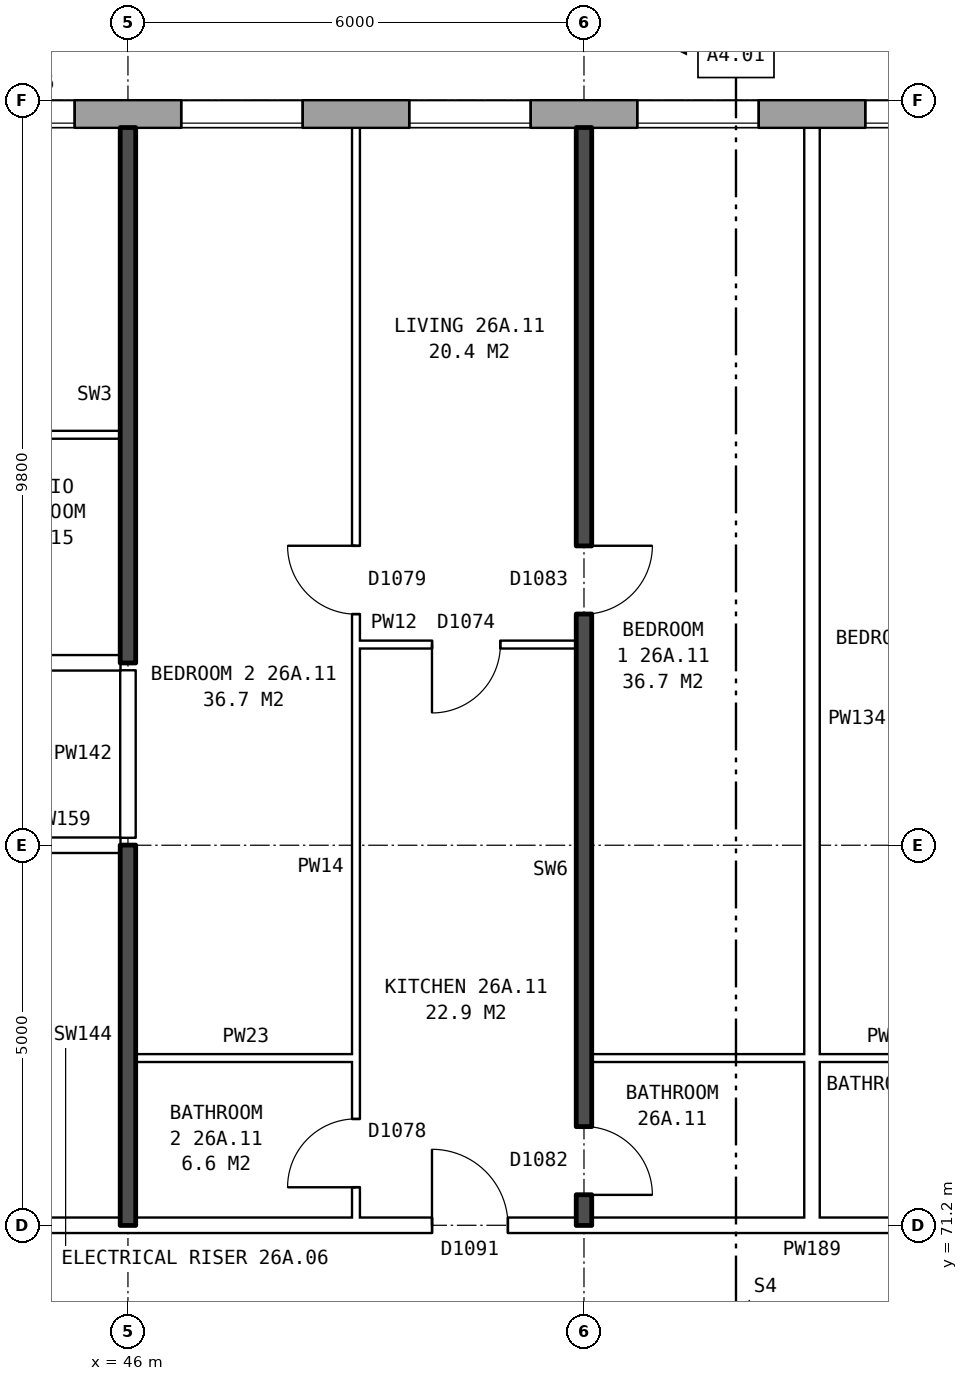
"""IFC4 building model, lengths in metres.
Left out: names, types, materials, properties, quantities, classifications, styles, units other than length and angle.
Written with IfcOpenShell. Run it as: python <this file> out.ifc"""

import sys

from ifc_helpers import new_model, si_unit, direction, frame, frame_2d, origin, place, context, subcontext, project, spatial, rectangle, extrude, element, fill, save


model = new_model("IFC4")
c1 = context("Model", 3, precision=1e-05, world=origin(), true_north=direction((0.0, 1.0)))
c2 = subcontext(c1, "Body", "Model", "MODEL_VIEW")
j1 = project(units=[si_unit("LENGTHUNIT", "METRE"), si_unit("PLANEANGLEUNIT", "RADIAN")], contexts=[c1])
p1 = place(None, origin())
s1 = spatial("IfcSite", under=j1, at=p1, CompositionType="ELEMENT")
p2 = place(p1, origin())
s2 = spatial("IfcBuilding", under=s1, at=p2, CompositionType="ELEMENT")
p3 = place(p2, frame((0.0, 0.0, 96.4)))
s3 = spatial("IfcBuildingStorey", under=s2, at=p3, CompositionType="ELEMENT", Elevation=96.4)
p4 = place(p3, frame((72.925, 85.82, 0.0), z_axis=(0.0, 0.0, 1.0), x_axis=(-1.0, 0.0, 0.0)))
e1 = element("IfcWall", 1, at=p4, inside=s3, PredefinedType="STANDARD", context=c2, shape_type="SweptSolid", body=[
    extrude(rectangle(XDim=44.851, YDim=0.36, at=frame_2d((22.425, 0.0))), origin(), (0.0, 0.0, 1.0), 2.85),
])
p5 = place(p4, frame((0.4, 0.0, 0.8)))
e2 = element("IfcOpeningElement", 2, at=p5, cuts=e1, PredefinedType="OPENING", context=c2, shape_type="SweptSolid", body=[
    extrude(rectangle(XDim=1.0, YDim=0.9, at=frame_2d((0.5, 0.45))), frame((0.0, 0.19, 0.0), z_axis=(0.0, -1.0, 0.0), x_axis=(1.0, 0.0, 0.0)), (0.0, 0.0, 1.0), 0.38),
])
p6 = place(p4, frame((3.625, 0.0, 0.8)))
e3 = element("IfcOpeningElement", 3, at=p6, cuts=e1, PredefinedType="OPENING", context=c2, shape_type="SweptSolid", body=[
    extrude(rectangle(XDim=1.6, YDim=1.8, at=frame_2d((0.8, 0.9))), frame((0.0, 0.19, 0.0), z_axis=(0.0, -1.0, 0.0), x_axis=(1.0, 0.0, 0.0)), (0.0, 0.0, 1.0), 0.38),
])
p7 = place(p4, frame((6.625, 0.0, 0.8)))
e4 = element("IfcOpeningElement", 4, at=p7, cuts=e1, PredefinedType="OPENING", context=c2, shape_type="SweptSolid", body=[
    extrude(rectangle(XDim=1.6, YDim=1.8, at=frame_2d((0.8, 0.9))), frame((0.0, 0.19, 0.0), z_axis=(0.0, -1.0, 0.0), x_axis=(1.0, 0.0, 0.0)), (0.0, 0.0, 1.0), 0.38),
])
p8 = place(p4, frame((9.625, 0.0, 0.8)))
e5 = element("IfcOpeningElement", 5, at=p8, cuts=e1, PredefinedType="OPENING", context=c2, shape_type="SweptSolid", body=[
    extrude(rectangle(XDim=1.6, YDim=1.8, at=frame_2d((0.8, 0.9))), frame((0.0, 0.19, 0.0), z_axis=(0.0, -1.0, 0.0), x_axis=(1.0, 0.0, 0.0)), (0.0, 0.0, 1.0), 0.38),
])
p9 = place(p4, frame((12.625, 0.0, 0.8)))
e6 = element("IfcOpeningElement", 6, at=p9, cuts=e1, PredefinedType="OPENING", context=c2, shape_type="SweptSolid", body=[
    extrude(rectangle(XDim=1.6, YDim=1.8, at=frame_2d((0.8, 0.9))), frame((0.0, 0.19, 0.0), z_axis=(0.0, -1.0, 0.0), x_axis=(1.0, 0.0, 0.0)), (0.0, 0.0, 1.0), 0.38),
])
p10 = place(p4, frame((15.625, 0.0, 0.8)))
e7 = element("IfcOpeningElement", 7, at=p10, cuts=e1, PredefinedType="OPENING", context=c2, shape_type="SweptSolid", body=[
    extrude(rectangle(XDim=1.6, YDim=1.8, at=frame_2d((0.8, 0.9))), frame((0.0, 0.19, 0.0), z_axis=(0.0, -1.0, 0.0), x_axis=(1.0, 0.0, 0.0)), (0.0, 0.0, 1.0), 0.38),
])
p11 = place(p4, frame((18.625, 0.0, 0.8)))
e8 = element("IfcOpeningElement", 8, at=p11, cuts=e1, PredefinedType="OPENING", context=c2, shape_type="SweptSolid", body=[
    extrude(rectangle(XDim=1.6, YDim=1.8, at=frame_2d((0.8, 0.9))), frame((0.0, 0.19, 0.0), z_axis=(0.0, -1.0, 0.0), x_axis=(1.0, 0.0, 0.0)), (0.0, 0.0, 1.0), 0.38),
])
p12 = place(p4, frame((21.625, 0.0, 0.8)))
e9 = element("IfcOpeningElement", 9, at=p12, cuts=e1, PredefinedType="OPENING", context=c2, shape_type="SweptSolid", body=[
    extrude(rectangle(XDim=1.6, YDim=1.8, at=frame_2d((0.8, 0.9))), frame((0.0, 0.19, 0.0), z_axis=(0.0, -1.0, 0.0), x_axis=(1.0, 0.0, 0.0)), (0.0, 0.0, 1.0), 0.38),
])
p13 = place(p4, frame((24.625, 0.0, 0.8)))
e10 = element("IfcOpeningElement", 10, at=p13, cuts=e1, PredefinedType="OPENING", context=c2, shape_type="SweptSolid", body=[
    extrude(rectangle(XDim=1.6, YDim=1.8, at=frame_2d((0.8, 0.9))), frame((0.0, 0.19, 0.0), z_axis=(0.0, -1.0, 0.0), x_axis=(1.0, 0.0, 0.0)), (0.0, 0.0, 1.0), 0.38),
])
p14 = place(p4, frame((27.625, 0.0, 0.8)))
e11 = element("IfcOpeningElement", 11, at=p14, cuts=e1, PredefinedType="OPENING", context=c2, shape_type="SweptSolid", body=[
    extrude(rectangle(XDim=1.6, YDim=1.8, at=frame_2d((0.8, 0.9))), frame((0.0, 0.19, 0.0), z_axis=(0.0, -1.0, 0.0), x_axis=(1.0, 0.0, 0.0)), (0.0, 0.0, 1.0), 0.38),
])
p15 = place(p4, frame((30.625, 0.0, 0.8)))
e12 = element("IfcOpeningElement", 12, at=p15, cuts=e1, PredefinedType="OPENING", context=c2, shape_type="SweptSolid", body=[
    extrude(rectangle(XDim=1.6, YDim=1.8, at=frame_2d((0.8, 0.9))), frame((0.0, 0.19, 0.0), z_axis=(0.0, -1.0, 0.0), x_axis=(1.0, 0.0, 0.0)), (0.0, 0.0, 1.0), 0.38),
])
p16 = place(p4, frame((33.625, 0.0, 0.8)))
e13 = element("IfcOpeningElement", 13, at=p16, cuts=e1, PredefinedType="OPENING", context=c2, shape_type="SweptSolid", body=[
    extrude(rectangle(XDim=1.6, YDim=1.8, at=frame_2d((0.8, 0.9))), frame((0.0, 0.19, 0.0), z_axis=(0.0, -1.0, 0.0), x_axis=(1.0, 0.0, 0.0)), (0.0, 0.0, 1.0), 0.38),
])
p17 = place(p4, frame((36.625, 0.0, 0.8)))
e14 = element("IfcOpeningElement", 14, at=p17, cuts=e1, PredefinedType="OPENING", context=c2, shape_type="SweptSolid", body=[
    extrude(rectangle(XDim=1.6, YDim=1.8, at=frame_2d((0.8, 0.9))), frame((0.0, 0.19, 0.0), z_axis=(0.0, -1.0, 0.0), x_axis=(1.0, 0.0, 0.0)), (0.0, 0.0, 1.0), 0.38),
])
p18 = place(p4, frame((39.625, 0.0, 0.8)))
e15 = element("IfcOpeningElement", 15, at=p18, cuts=e1, PredefinedType="OPENING", context=c2, shape_type="SweptSolid", body=[
    extrude(rectangle(XDim=1.6, YDim=1.8, at=frame_2d((0.8, 0.9))), frame((0.0, 0.19, 0.0), z_axis=(0.0, -1.0, 0.0), x_axis=(1.0, 0.0, 0.0)), (0.0, 0.0, 1.0), 0.38),
])
p19 = place(p4, frame((41.525, 0.0, 0.8)))
e16 = element("IfcOpeningElement", 16, at=p19, cuts=e1, PredefinedType="OPENING", context=c2, shape_type="SweptSolid", body=[
    extrude(rectangle(XDim=1.6, YDim=1.8, at=frame_2d((0.8, 0.9))), frame((0.0, 0.19, 0.0), z_axis=(0.0, -1.0, 0.0), x_axis=(1.0, 0.0, 0.0)), (0.0, 0.0, 1.0), 0.38),
])
p20 = place(p4, frame((1.7, 0.0, 0.8)))
e17 = element("IfcOpeningElement", 17, at=p20, cuts=e1, PredefinedType="OPENING", context=c2, shape_type="SweptSolid", body=[
    extrude(rectangle(XDim=1.0, YDim=1.8, at=frame_2d((0.5, 0.9))), frame((0.0, 0.19, 0.0), z_axis=(0.0, -1.0, 0.0), x_axis=(1.0, 0.0, 0.0)), (0.0, 0.0, 1.0), 0.38),
])
p21 = place(p4, frame((43.425, 0.0, 0.8)))
e18 = element("IfcOpeningElement", 18, at=p21, cuts=e1, PredefinedType="OPENING", context=c2, shape_type="SweptSolid", body=[
    extrude(rectangle(XDim=0.6, YDim=1.2, at=frame_2d((0.3, 0.6))), frame((0.0, 0.19, 0.0), z_axis=(0.0, -1.0, 0.0), x_axis=(1.0, 0.0, 0.0)), (0.0, 0.0, 1.0), 0.38),
])
p22 = place(p3, frame((44.36, 71.2, 0.0), z_axis=(0.0, 0.0, 1.0), x_axis=(1.0, 0.0, 0.0)))
e19 = element("IfcWall", 19, at=p22, inside=s3, PredefinedType="PARTITIONING", context=c2, shape_type="SweptSolid", body=[
    extrude(rectangle(XDim=19.28, YDim=0.2, at=frame_2d((9.64, 0.0))), origin(), (0.0, 0.0, 1.0), 2.85),
])
p23 = place(p22, frame((14.64, 0.0, 0.0)))
e20 = element("IfcOpeningElement", 20, at=p23, cuts=e19, PredefinedType="OPENING", context=c2, shape_type="SweptSolid", body=[
    extrude(rectangle(XDim=1.0, YDim=2.1, at=frame_2d((0.5, 1.05))), frame((0.0, 0.11, 0.0), z_axis=(0.0, -1.0, 0.0), x_axis=(1.0, 0.0, 0.0)), (0.0, 0.0, 1.0), 0.22),
])
p24 = place(p22, frame((5.64, 0.0, 0.0)))
e21 = element("IfcOpeningElement", 21, at=p24, cuts=e19, PredefinedType="OPENING", context=c2, shape_type="SweptSolid", body=[
    extrude(rectangle(XDim=1.0, YDim=2.1, at=frame_2d((0.5, 1.05))), frame((0.0, 0.11, 0.0), z_axis=(0.0, -1.0, 0.0), x_axis=(1.0, 0.0, 0.0)), (0.0, 0.0, 1.0), 0.22),
])
p25 = place(p3, frame((46.1, 73.4, 0.0), z_axis=(0.0, 0.0, 1.0), x_axis=(1.0, 0.0, 0.0)))
e22 = element("IfcWall", 22, at=p25, inside=s3, PredefinedType="PARTITIONING", context=c2, shape_type="SweptSolid", body=[
    extrude(rectangle(XDim=2.9, YDim=0.1, at=frame_2d((1.45, 0.0))), origin(), (0.0, 0.0, 1.0), 2.85),
])
p26 = place(p3, frame((52.1, 73.4, 0.0), z_axis=(0.0, 0.0, 1.0), x_axis=(1.0, 0.0, 0.0)))
e23 = element("IfcWall", 23, at=p26, inside=s3, PredefinedType="PARTITIONING", context=c2, shape_type="SweptSolid", body=[
    extrude(rectangle(XDim=5.8, YDim=0.1, at=frame_2d((2.9, 0.0))), origin(), (0.0, 0.0, 1.0), 2.85),
])
p27 = place(p3, frame((44.36, 76.2, 0.0), z_axis=(0.0, 0.0, 1.0), x_axis=(1.0, 0.0, 0.0)))
e24 = element("IfcWall", 24, at=p27, inside=s3, PredefinedType="PARTITIONING", context=c2, shape_type="SweptSolid", body=[
    extrude(rectangle(XDim=1.54, YDim=0.2, at=frame_2d((0.77, 0.0))), origin(), (0.0, 0.0, 1.0), 2.85),
])
p28 = place(p3, frame((25.36, 78.6, 0.0), z_axis=(0.0, 0.0, 1.0), x_axis=(1.0, 0.0, 0.0)))
e25 = element("IfcWall", 25, at=p28, inside=s3, PredefinedType="PARTITIONING", context=c2, shape_type="SweptSolid", body=[
    extrude(rectangle(XDim=20.54, YDim=0.2, at=frame_2d((10.27, 0.0))), origin(), (0.0, 0.0, 1.0), 2.85),
])
p29 = place(p28, frame((15.94, 0.0, 0.0)))
e26 = element("IfcOpeningElement", 26, at=p29, cuts=e25, PredefinedType="OPENING", context=c2, shape_type="SweptSolid", body=[
    extrude(rectangle(XDim=1.0, YDim=2.1, at=frame_2d((0.5, 1.05))), frame((0.0, 0.11, 0.0), z_axis=(0.0, -1.0, 0.0), x_axis=(1.0, 0.0, 0.0)), (0.0, 0.0, 1.0), 0.22),
])
p30 = place(p28, frame((9.94, 0.0, 0.0)))
e27 = element("IfcOpeningElement", 27, at=p30, cuts=e25, PredefinedType="OPENING", context=c2, shape_type="SweptSolid", body=[
    extrude(rectangle(XDim=1.0, YDim=2.1, at=frame_2d((0.5, 1.05))), frame((0.0, 0.11, 0.0), z_axis=(0.0, -1.0, 0.0), x_axis=(1.0, 0.0, 0.0)), (0.0, 0.0, 1.0), 0.22),
])
p31 = place(p28, frame((2.62, 0.0, 0.0)))
e28 = element("IfcOpeningElement", 28, at=p31, cuts=e25, PredefinedType="OPENING", context=c2, shape_type="SweptSolid", body=[
    extrude(rectangle(XDim=1.0, YDim=2.1, at=frame_2d((0.5, 1.05))), frame((0.0, 0.11, 0.0), z_axis=(0.0, -1.0, 0.0), x_axis=(1.0, 0.0, 0.0)), (0.0, 0.0, 1.0), 0.22),
])
p32 = place(p3, frame((49.0, 78.84, 0.0), z_axis=(0.0, 0.0, 1.0), x_axis=(1.0, 0.0, 0.0)))
e29 = element("IfcWall", 29, at=p32, inside=s3, PredefinedType="PARTITIONING", context=c2, shape_type="SweptSolid", body=[
    extrude(rectangle(XDim=2.9, YDim=0.1, at=frame_2d((1.45, 0.0))), origin(), (0.0, 0.0, 1.0), 2.85),
])
p33 = place(p32, frame((1.0, 0.0, 0.0)))
e30 = element("IfcOpeningElement", 30, at=p33, cuts=e29, PredefinedType="OPENING", context=c2, shape_type="SweptSolid", body=[
    extrude(rectangle(XDim=0.9, YDim=2.1, at=frame_2d((0.45, 1.05))), frame((0.0, 0.06, 0.0), z_axis=(0.0, -1.0, 0.0), x_axis=(1.0, 0.0, 0.0)), (0.0, 0.0, 1.0), 0.12),
])
p34 = place(p3, frame((43.6, 81.6, 0.0), z_axis=(0.0, 0.0, 1.0), x_axis=(1.0, 0.0, 0.0)))
e31 = element("IfcWall", 31, at=p34, inside=s3, PredefinedType="PARTITIONING", context=c2, shape_type="SweptSolid", body=[
    extrude(rectangle(XDim=2.3, YDim=0.1, at=frame_2d((1.15, 0.0))), origin(), (0.0, 0.0, 1.0), 2.85),
])
p35 = place(p3, frame((46.0, 71.2, 0.0), z_axis=(0.0, 0.0, 1.0), x_axis=(0.0, 1.0, 0.0)))
e32 = element("IfcWall", 32, at=p35, inside=s3, PredefinedType="SOLIDWALL", context=c2, shape_type="SweptSolid", body=[
    extrude(rectangle(XDim=5.0, YDim=0.2, at=frame_2d((2.5, 0.0))), origin(), (0.0, 0.0, 1.0), 2.85),
])
p36 = place(p3, frame((46.0, 76.3, 0.0), z_axis=(0.0, 0.0, 1.0), x_axis=(0.0, 1.0, 0.0)))
e33 = element("IfcWall", 33, at=p36, inside=s3, PredefinedType="PARTITIONING", context=c2, shape_type="SweptSolid", body=[
    extrude(rectangle(XDim=2.2, YDim=0.2, at=frame_2d((1.1, 0.0))), origin(), (0.0, 0.0, 1.0), 2.85),
])
p37 = place(p3, frame((46.0, 78.6, 0.0), z_axis=(0.0, 0.0, 1.0), x_axis=(0.0, 1.0, 0.0)))
e34 = element("IfcWall", 34, at=p37, inside=s3, PredefinedType="SOLIDWALL", context=c2, shape_type="SweptSolid", body=[
    extrude(rectangle(XDim=7.04, YDim=0.2, at=frame_2d((3.52, 0.0))), origin(), (0.0, 0.0, 1.0), 2.85),
])
p38 = place(p3, frame((49.0, 71.3, 0.0), z_axis=(0.0, 0.0, 1.0), x_axis=(0.0, 1.0, 0.0)))
e35 = element("IfcWall", 35, at=p38, inside=s3, PredefinedType="PARTITIONING", context=c2, shape_type="SweptSolid", body=[
    extrude(rectangle(XDim=14.34, YDim=0.1, at=frame_2d((7.17, 0.0))), origin(), (0.0, 0.0, 1.0), 2.85),
])
p39 = place(p38, frame((7.94, 0.0, 0.0)))
e36 = element("IfcOpeningElement", 36, at=p39, cuts=e35, PredefinedType="OPENING", context=c2, shape_type="SweptSolid", body=[
    extrude(rectangle(XDim=0.9, YDim=2.1, at=frame_2d((0.45, 1.05))), frame((0.0, 0.06, 0.0), z_axis=(0.0, -1.0, 0.0), x_axis=(1.0, 0.0, 0.0)), (0.0, 0.0, 1.0), 0.12),
])
p40 = place(p38, frame((0.4, 0.0, 0.0)))
e37 = element("IfcOpeningElement", 37, at=p40, cuts=e35, PredefinedType="OPENING", context=c2, shape_type="SweptSolid", body=[
    extrude(rectangle(XDim=0.9, YDim=2.1, at=frame_2d((0.45, 1.05))), frame((0.0, 0.06, 0.0), z_axis=(0.0, -1.0, 0.0), x_axis=(1.0, 0.0, 0.0)), (0.0, 0.0, 1.0), 0.12),
])
p41 = place(p3, frame((52.0, 71.2, 0.0), z_axis=(0.0, 0.0, 1.0), x_axis=(0.0, 1.0, 0.0)))
e38 = element("IfcWall", 38, at=p41, inside=s3, PredefinedType="SOLIDWALL", context=c2, shape_type="SweptSolid", body=[
    extrude(rectangle(XDim=14.44, YDim=0.2, at=frame_2d((7.22, 0.0))), origin(), (0.0, 0.0, 1.0), 2.85),
])
p42 = place(p41, frame((8.04, 0.0, 0.0)))
e39 = element("IfcOpeningElement", 39, at=p42, cuts=e38, PredefinedType="OPENING", context=c2, shape_type="SweptSolid", body=[
    extrude(rectangle(XDim=0.9, YDim=2.1, at=frame_2d((0.45, 1.05))), frame((0.0, 0.11, 0.0), z_axis=(0.0, -1.0, 0.0), x_axis=(1.0, 0.0, 0.0)), (0.0, 0.0, 1.0), 0.22),
])
p43 = place(p41, frame((0.4, 0.0, 0.0)))
e40 = element("IfcOpeningElement", 40, at=p43, cuts=e38, PredefinedType="OPENING", context=c2, shape_type="SweptSolid", body=[
    extrude(rectangle(XDim=0.9, YDim=2.1, at=frame_2d((0.45, 1.05))), frame((0.0, 0.11, 0.0), z_axis=(0.0, -1.0, 0.0), x_axis=(1.0, 0.0, 0.0)), (0.0, 0.0, 1.0), 0.22),
])
p44 = place(p3, frame((55.0, 71.3, 0.0), z_axis=(0.0, 0.0, 1.0), x_axis=(0.0, 1.0, 0.0)))
e41 = element("IfcWall", 41, at=p44, inside=s3, PredefinedType="PARTITIONING", context=c2, shape_type="SweptSolid", body=[
    extrude(rectangle(XDim=14.34, YDim=0.2, at=frame_2d((7.17, 0.0))), origin(), (0.0, 0.0, 1.0), 2.85),
])
p45 = place(p10, origin())
e42 = element("IfcWindow", 42, at=p45, inside=s3, PartitioningType="SINGLE_PANEL", PredefinedType="WINDOW", context=c2, shape_type="SweptSolid", body=[
    extrude(rectangle(XDim=1.6, YDim=1.8, at=frame_2d((0.8, 0.9))), frame((0.0, 0.15, 0.0), z_axis=(0.0, -1.0, 0.0), x_axis=(1.0, 0.0, 0.0)), (0.0, 0.0, 1.0), 0.06),
])
fill(e7, e42)
p46 = place(p11, origin())
e43 = element("IfcWindow", 43, at=p46, inside=s3, PartitioningType="SINGLE_PANEL", PredefinedType="WINDOW", context=c2, shape_type="SweptSolid", body=[
    extrude(rectangle(XDim=1.6, YDim=1.8, at=frame_2d((0.8, 0.9))), frame((0.0, 0.15, 0.0), z_axis=(0.0, -1.0, 0.0), x_axis=(1.0, 0.0, 0.0)), (0.0, 0.0, 1.0), 0.06),
])
fill(e8, e43)
p47 = place(p12, origin())
e44 = element("IfcWindow", 44, at=p47, inside=s3, PartitioningType="SINGLE_PANEL", PredefinedType="WINDOW", context=c2, shape_type="SweptSolid", body=[
    extrude(rectangle(XDim=1.6, YDim=1.8, at=frame_2d((0.8, 0.9))), frame((0.0, 0.15, 0.0), z_axis=(0.0, -1.0, 0.0), x_axis=(1.0, 0.0, 0.0)), (0.0, 0.0, 1.0), 0.06),
])
fill(e9, e44)
p48 = place(p13, origin())
e45 = element("IfcWindow", 45, at=p48, inside=s3, PartitioningType="SINGLE_PANEL", PredefinedType="WINDOW", context=c2, shape_type="SweptSolid", body=[
    extrude(rectangle(XDim=1.6, YDim=1.8, at=frame_2d((0.8, 0.9))), frame((0.0, 0.15, 0.0), z_axis=(0.0, -1.0, 0.0), x_axis=(1.0, 0.0, 0.0)), (0.0, 0.0, 1.0), 0.06),
])
fill(e10, e45)
p49 = place(p14, origin())
e46 = element("IfcWindow", 46, at=p49, inside=s3, PartitioningType="SINGLE_PANEL", PredefinedType="WINDOW", context=c2, shape_type="SweptSolid", body=[
    extrude(rectangle(XDim=1.6, YDim=1.8, at=frame_2d((0.8, 0.9))), frame((0.0, 0.15, 0.0), z_axis=(0.0, -1.0, 0.0), x_axis=(1.0, 0.0, 0.0)), (0.0, 0.0, 1.0), 0.06),
])
fill(e11, e46)
p50 = place(p42, frame((0.9, 0.0, 0.0), z_axis=(0.0, 0.0, 1.0), x_axis=(-1.0, 0.0, 0.0)))
e47 = element("IfcDoor", 47, at=p50, inside=s3, OperationType="SINGLE_SWING_LEFT", PredefinedType="DOOR", context=c2, shape_type="SweptSolid", body=[
    extrude(rectangle(XDim=0.9, YDim=2.1, at=frame_2d((0.45, 1.05))), frame((0.0, 0.025, 0.0), z_axis=(0.0, -1.0, 0.0), x_axis=(1.0, 0.0, 0.0)), (0.0, 0.0, 1.0), 0.05),
])
fill(e39, e47)
p51 = place(p39, origin())
e48 = element("IfcDoor", 48, at=p51, inside=s3, OperationType="SINGLE_SWING_RIGHT", PredefinedType="DOOR", context=c2, shape_type="SweptSolid", body=[
    extrude(rectangle(XDim=0.9, YDim=2.1, at=frame_2d((0.45, 1.05))), frame((0.0, 0.025, 0.0), z_axis=(0.0, -1.0, 0.0), x_axis=(1.0, 0.0, 0.0)), (0.0, 0.0, 1.0), 0.05),
])
fill(e36, e48)
p52 = place(p24, origin())
e49 = element("IfcDoor", 49, at=p52, inside=s3, OperationType="SINGLE_SWING_LEFT", PredefinedType="DOOR", context=c2, shape_type="SweptSolid", body=[
    extrude(rectangle(XDim=1.0, YDim=2.1, at=frame_2d((0.5, 1.05))), frame((0.0, 0.025, 0.0), z_axis=(0.0, -1.0, 0.0), x_axis=(1.0, 0.0, 0.0)), (0.0, 0.0, 1.0), 0.05),
])
fill(e21, e49)
p53 = place(p33, frame((0.9, 0.0, 0.0), z_axis=(0.0, 0.0, 1.0), x_axis=(-1.0, 0.0, 0.0)))
e50 = element("IfcDoor", 50, at=p53, inside=s3, OperationType="SINGLE_SWING_RIGHT", PredefinedType="DOOR", context=c2, shape_type="SweptSolid", body=[
    extrude(rectangle(XDim=0.9, YDim=2.1, at=frame_2d((0.45, 1.05))), frame((0.0, 0.025, 0.0), z_axis=(0.0, -1.0, 0.0), x_axis=(1.0, 0.0, 0.0)), (0.0, 0.0, 1.0), 0.05),
])
fill(e30, e50)
p54 = place(p43, frame((0.9, 0.0, 0.0), z_axis=(0.0, 0.0, 1.0), x_axis=(-1.0, 0.0, 0.0)))
e51 = element("IfcDoor", 51, at=p54, inside=s3, OperationType="SINGLE_SWING_RIGHT", PredefinedType="DOOR", context=c2, shape_type="SweptSolid", body=[
    extrude(rectangle(XDim=0.9, YDim=2.1, at=frame_2d((0.45, 1.05))), frame((0.0, 0.025, 0.0), z_axis=(0.0, -1.0, 0.0), x_axis=(1.0, 0.0, 0.0)), (0.0, 0.0, 1.0), 0.05),
])
fill(e40, e51)
p55 = place(p40, origin())
e52 = element("IfcDoor", 52, at=p55, inside=s3, OperationType="SINGLE_SWING_LEFT", PredefinedType="DOOR", context=c2, shape_type="SweptSolid", body=[
    extrude(rectangle(XDim=0.9, YDim=2.1, at=frame_2d((0.45, 1.05))), frame((0.0, 0.025, 0.0), z_axis=(0.0, -1.0, 0.0), x_axis=(1.0, 0.0, 0.0)), (0.0, 0.0, 1.0), 0.05),
])
fill(e37, e52)
save(model, sys.argv[1])
